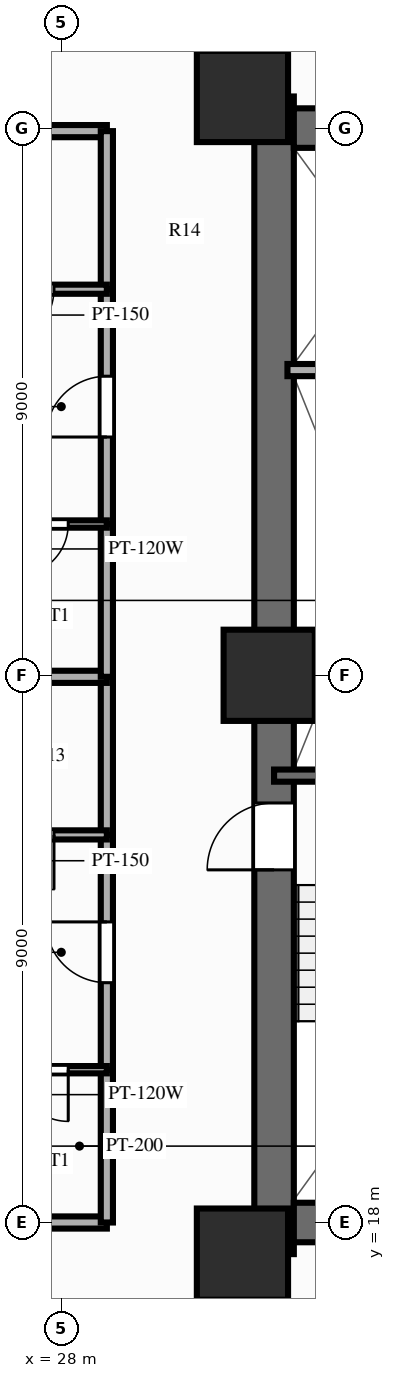
"""IFC4 building model, lengths in metres.
Left out: names, types, materials, properties, quantities, classifications, styles, units other than length and angle.
Written with IfcOpenShell. Run it as: python <this file> out.ifc"""

import sys

from ifc_helpers import new_model, si_unit, direction, frame, frame_2d, origin, origin_2d, place, context, subcontext, project, spatial, rectangle, extrude, source, transform, mapped, element, fill, save


model = new_model("IFC4")
c1 = context("Model", 3, precision=1e-05, world=origin(), true_north=direction((0.0, 1.0)))
c2 = subcontext(c1, "Body", "Model", "MODEL_VIEW")
j1 = project(units=[si_unit("LENGTHUNIT", "METRE"), si_unit("PLANEANGLEUNIT", "RADIAN")], contexts=[c1])
p1 = place(None, origin())
s1 = spatial("IfcSite", under=j1, at=p1, CompositionType="ELEMENT")
p2 = place(p1, origin())
s2 = spatial("IfcBuilding", under=s1, at=p2, CompositionType="ELEMENT")
p3 = place(p2, frame((0.0, 0.0, 46.4)))
s3 = spatial("IfcBuildingStorey", under=s2, at=p3, CompositionType="ELEMENT", Elevation=46.4)
p4 = place(p3, frame((31.5, 17.48, 0.0), z_axis=(0.0, 0.0, 1.0), x_axis=(0.0, 1.0, 0.0)))
e1 = element("IfcWall", 1, at=p4, inside=s3, PredefinedType="SHEAR", context=c2, shape_type="SweptSolid", body=[
    extrude(rectangle(XDim=19.04, YDim=0.65, at=frame_2d((9.52, 0.0))), origin(), (0.0, 0.0, 1.0), 3.0),
])
p5 = place(p4, frame((6.32, 0.0, 0.0)))
e2 = element("IfcOpeningElement", 2, at=p5, cuts=e1, PredefinedType="OPENING", context=c2, shape_type="SweptSolid", body=[
    extrude(rectangle(XDim=1.1, YDim=2.15, at=frame_2d((0.55, 1.075))), frame((0.0, 0.337, 0.0), z_axis=(0.0, -1.0, 0.0), x_axis=(1.0, 0.0, 0.0)), (0.0, 0.0, 1.0), 0.674),
])
p6 = place(p3, frame((31.825, 18.0, 0.0), z_axis=(0.0, 0.0, 1.0), x_axis=(1.0, 0.0, 0.0)))
e3 = element("IfcWall", 3, at=p6, inside=s3, PredefinedType="SHEAR", context=c2, shape_type="SweptSolid", body=[
    extrude(rectangle(XDim=12.35, YDim=0.65, at=frame_2d((6.175, 0.0))), origin(), (0.0, 0.0, 1.0), 3.0),
])
p7 = place(p3, frame((31.825, 36.0, 0.0), z_axis=(0.0, 0.0, 1.0), x_axis=(1.0, 0.0, 0.0)))
e4 = element("IfcWall", 4, at=p7, inside=s3, PredefinedType="SHEAR", context=c2, shape_type="SweptSolid", body=[
    extrude(rectangle(XDim=12.35, YDim=0.65, at=frame_2d((6.175, 0.0))), origin(), (0.0, 0.0, 1.0), 3.0),
])
p8 = place(p7, frame((5.125, 0.0, 0.0), z_axis=(0.0, 0.0, 1.0), x_axis=(-1.0, 0.0, 0.0)))
e5 = element("IfcOpeningElement", 5, at=p8, cuts=e4, PredefinedType="OPENING", context=c2, shape_type="SweptSolid", body=[
    extrude(rectangle(XDim=1.4, YDim=2.15, at=frame_2d((0.7, 1.075))), frame((0.0, 0.337, 0.0), z_axis=(0.0, -1.0, 0.0), x_axis=(1.0, 0.0, 0.0)), (0.0, 0.0, 1.0), 0.674),
])
m1 = source(origin(), c2, "Body", "SweptSolid", [
    extrude(rectangle(XDim=1.5, YDim=1.5, at=origin_2d()), origin(), (0.0, 0.0, 1.0), 3.0),
])
for number, where, z_axis, x_axis in (
    (6, (30.98, 17.48, 0.0), (0.0, 0.0, 1.0), (1.0, 0.0, 0.0)),
    (7, (30.98, 36.52, 0.0), (0.0, 0.0, 1.0), (1.0, 0.0, 0.0)),
    (8, (31.42, 27.0, 0.0), (0.0, 0.0, 1.0), (1.0, 0.0, 0.0)),
):
    element("IfcColumn", number, at=place(p3, frame(where, z_axis=z_axis, x_axis=x_axis)), inside=s3, PredefinedType="COLUMN", context=c2, shape_type="MappedRepresentation", body=[
        mapped(m1, transform((0.0, 0.0, 0.0), scale=1.0)),
    ])
p9 = place(p3, frame((31.5, 25.35, 0.0), z_axis=(0.0, 0.0, 1.0), x_axis=(1.0, 0.0, 0.0)))
e9 = element("IfcWall", 9, at=p9, inside=s3, PredefinedType="SOLIDWALL", context=c2, shape_type="SweptSolid", body=[
    extrude(rectangle(XDim=3.93, YDim=0.2, at=frame_2d((1.965, 0.0))), origin(), (0.0, 0.0, 1.0), 2.79),
])
p10 = place(p3, frame((31.72, 32.02, 0.0), z_axis=(0.0, 0.0, 1.0), x_axis=(1.0, 0.0, 0.0)))
e10 = element("IfcWall", 10, at=p10, inside=s3, PredefinedType="PARTITIONING", context=c2, shape_type="SweptSolid", body=[
    extrude(rectangle(XDim=2.8, YDim=0.2, at=frame_2d((1.4, 0.0))), origin(), (0.0, 0.0, 1.0), 2.79),
])
for number, where, z_axis, x_axis in (
    (11, (28.75, 18.0, 0.0), (0.0, 0.0, 1.0), (-1.0, 0.0, 0.0)),
    (12, (28.75, 35.95, 0.0), (0.0, 0.0, 1.0), (-1.0, 0.0, 0.0)),
):
    element("IfcWall", number, at=place(p3, frame(where, z_axis=z_axis, x_axis=x_axis)), inside=s3, PredefinedType="PARTITIONING", context=c2, shape_type="SweptSolid", body=[
        extrude(rectangle(XDim=16.6, YDim=0.2, at=frame_2d((8.3, 0.0))), origin(), (0.0, 0.0, 1.0), 2.24),
    ])
p11 = place(p3, frame((28.75, 18.0, 0.0), z_axis=(0.0, 0.0, 1.0), x_axis=(0.0, 1.0, 0.0)))
e13 = element("IfcWall", 13, at=p11, inside=s3, PredefinedType="PARTITIONING", context=c2, shape_type="SweptSolid", body=[
    extrude(rectangle(XDim=2.513, YDim=0.2, at=frame_2d((1.256, 0.0))), origin(), (0.0, 0.0, 1.0), 2.79),
])
p12 = place(p3, frame((28.75, 20.513, 0.0), z_axis=(0.0, 0.0, 1.0), x_axis=(0.0, 1.0, 0.0)))
e14 = element("IfcWall", 14, at=p12, inside=s3, PredefinedType="PARTITIONING", context=c2, shape_type="SweptSolid", body=[
    extrude(rectangle(XDim=3.862, YDim=0.2, at=frame_2d((1.931, 0.0))), origin(), (0.0, 0.0, 1.0), 2.79),
])
p13 = place(p12, frame((1.431, 0.0, 0.0)))
e15 = element("IfcOpeningElement", 15, at=p13, cuts=e14, PredefinedType="OPENING", context=c2, shape_type="SweptSolid", body=[
    extrude(rectangle(XDim=1.0, YDim=2.15, at=frame_2d((0.5, 1.075))), frame((0.0, 0.112, 0.0), z_axis=(0.0, -1.0, 0.0), x_axis=(1.0, 0.0, 0.0)), (0.0, 0.0, 1.0), 0.224),
])
p14 = place(p3, frame((28.75, 24.375, 0.0), z_axis=(0.0, 0.0, 1.0), x_axis=(0.0, 1.0, 0.0)))
e16 = element("IfcWall", 16, at=p14, inside=s3, PredefinedType="PARTITIONING", context=c2, shape_type="SweptSolid", body=[
    extrude(rectangle(XDim=2.6, YDim=0.2, at=frame_2d((1.3, 0.0))), origin(), (0.0, 0.0, 1.0), 2.79),
])
p15 = place(p3, frame((28.75, 20.513, 0.0), z_axis=(0.0, 0.0, 1.0), x_axis=(-1.0, 0.0, 0.0)))
e17 = element("IfcWall", 17, at=p15, inside=s3, PredefinedType="PARTITIONING", context=c2, shape_type="SweptSolid", body=[
    extrude(rectangle(XDim=2.12, YDim=0.12, at=frame_2d((1.06, 0.0))), origin(), (0.0, 0.0, 1.0), 2.79),
])
p16 = place(p15, frame((0.635, 0.0, 0.0)))
e18 = element("IfcOpeningElement", 18, at=p16, cuts=e17, PredefinedType="OPENING", context=c2, shape_type="SweptSolid", body=[
    extrude(rectangle(XDim=0.85, YDim=2.05, at=frame_2d((0.425, 1.025))), frame((0.0, 0.072, 0.0), z_axis=(0.0, -1.0, 0.0), x_axis=(1.0, 0.0, 0.0)), (0.0, 0.0, 1.0), 0.144),
])
p17 = place(p3, frame((28.75, 24.375, 0.0), z_axis=(0.0, 0.0, 1.0), x_axis=(-1.0, 0.0, 0.0)))
e19 = element("IfcWall", 19, at=p17, inside=s3, PredefinedType="PARTITIONING", context=c2, shape_type="SweptSolid", body=[
    extrude(rectangle(XDim=2.64, YDim=0.15, at=frame_2d((1.32, 0.0))), origin(), (0.0, 0.0, 1.0), 2.79),
])
p18 = place(p17, frame((0.87, 0.0, 0.0)))
e20 = element("IfcOpeningElement", 20, at=p18, cuts=e19, PredefinedType="OPENING", context=c2, shape_type="SweptSolid", body=[
    extrude(rectangle(XDim=0.9, YDim=2.1, at=frame_2d((0.45, 1.05))), frame((0.0, 0.087, 0.0), z_axis=(0.0, -1.0, 0.0), x_axis=(1.0, 0.0, 0.0)), (0.0, 0.0, 1.0), 0.174),
])
p19 = place(p3, frame((28.75, 26.975, 0.0), z_axis=(0.0, 0.0, 1.0), x_axis=(-1.0, 0.0, 0.0)))
e21 = element("IfcWall", 21, at=p19, inside=s3, PredefinedType="PARTITIONING", context=c2, shape_type="SweptSolid", body=[
    extrude(rectangle(XDim=16.6, YDim=0.2, at=frame_2d((8.3, 0.0))), origin(), (0.0, 0.0, 1.0), 2.79),
])
p20 = place(p3, frame((28.75, 26.975, 0.0), z_axis=(0.0, 0.0, 1.0), x_axis=(0.0, 1.0, 0.0)))
e22 = element("IfcWall", 22, at=p20, inside=s3, PredefinedType="PARTITIONING", context=c2, shape_type="SweptSolid", body=[
    extrude(rectangle(XDim=2.513, YDim=0.2, at=frame_2d((1.256, 0.0))), origin(), (0.0, 0.0, 1.0), 2.79),
])
p21 = place(p3, frame((28.75, 29.488, 0.0), z_axis=(0.0, 0.0, 1.0), x_axis=(0.0, 1.0, 0.0)))
e23 = element("IfcWall", 23, at=p21, inside=s3, PredefinedType="PARTITIONING", context=c2, shape_type="SweptSolid", body=[
    extrude(rectangle(XDim=3.862, YDim=0.2, at=frame_2d((1.931, 0.0))), origin(), (0.0, 0.0, 1.0), 2.79),
])
p22 = place(p21, frame((1.431, 0.0, 0.0)))
e24 = element("IfcOpeningElement", 24, at=p22, cuts=e23, PredefinedType="OPENING", context=c2, shape_type="SweptSolid", body=[
    extrude(rectangle(XDim=1.0, YDim=2.15, at=frame_2d((0.5, 1.075))), frame((0.0, 0.112, 0.0), z_axis=(0.0, -1.0, 0.0), x_axis=(1.0, 0.0, 0.0)), (0.0, 0.0, 1.0), 0.224),
])
p23 = place(p3, frame((28.75, 33.35, 0.0), z_axis=(0.0, 0.0, 1.0), x_axis=(0.0, 1.0, 0.0)))
e25 = element("IfcWall", 25, at=p23, inside=s3, PredefinedType="PARTITIONING", context=c2, shape_type="SweptSolid", body=[
    extrude(rectangle(XDim=2.6, YDim=0.2, at=frame_2d((1.3, 0.0))), origin(), (0.0, 0.0, 1.0), 2.79),
])
p24 = place(p3, frame((28.75, 29.488, 0.0), z_axis=(0.0, 0.0, 1.0), x_axis=(-1.0, 0.0, 0.0)))
e26 = element("IfcWall", 26, at=p24, inside=s3, PredefinedType="PARTITIONING", context=c2, shape_type="SweptSolid", body=[
    extrude(rectangle(XDim=2.12, YDim=0.12, at=frame_2d((1.06, 0.0))), origin(), (0.0, 0.0, 1.0), 2.79),
])
p25 = place(p24, frame((0.635, 0.0, 0.0)))
e27 = element("IfcOpeningElement", 27, at=p25, cuts=e26, PredefinedType="OPENING", context=c2, shape_type="SweptSolid", body=[
    extrude(rectangle(XDim=0.85, YDim=2.05, at=frame_2d((0.425, 1.025))), frame((0.0, 0.072, 0.0), z_axis=(0.0, -1.0, 0.0), x_axis=(1.0, 0.0, 0.0)), (0.0, 0.0, 1.0), 0.144),
])
p26 = place(p3, frame((28.75, 33.35, 0.0), z_axis=(0.0, 0.0, 1.0), x_axis=(-1.0, 0.0, 0.0)))
e28 = element("IfcWall", 28, at=p26, inside=s3, PredefinedType="PARTITIONING", context=c2, shape_type="SweptSolid", body=[
    extrude(rectangle(XDim=2.64, YDim=0.15, at=frame_2d((1.32, 0.0))), origin(), (0.0, 0.0, 1.0), 2.79),
])
p27 = place(p26, frame((0.87, 0.0, 0.0)))
e29 = element("IfcOpeningElement", 29, at=p27, cuts=e28, PredefinedType="OPENING", context=c2, shape_type="SweptSolid", body=[
    extrude(rectangle(XDim=0.9, YDim=2.1, at=frame_2d((0.45, 1.05))), frame((0.0, 0.087, 0.0), z_axis=(0.0, -1.0, 0.0), x_axis=(1.0, 0.0, 0.0)), (0.0, 0.0, 1.0), 0.174),
])
m2 = source(origin(), c2, "Body", "SweptSolid", [
    extrude(rectangle(XDim=1.1, YDim=2.15, at=frame_2d((0.55, 1.075))), frame((0.0, 0.025, 0.0), z_axis=(0.0, -1.0, 0.0), x_axis=(1.0, 0.0, 0.0)), (0.0, 0.0, 1.0), 0.05),
])
p28 = place(p5, origin())
e30 = element("IfcDoor", 30, at=p28, inside=s3, OperationType="SINGLE_SWING_LEFT", PredefinedType="DOOR", context=c2, shape_type="MappedRepresentation", body=[
    mapped(m2, transform((0.0, 0.0, 0.0), scale=1.0)),
])
fill(e2, e30)
m3 = source(origin(), c2, "Body", "SweptSolid", [
    extrude(rectangle(XDim=1.0, YDim=2.15, at=frame_2d((0.5, 1.075))), frame((0.0, 0.025, 0.0), z_axis=(0.0, -1.0, 0.0), x_axis=(1.0, 0.0, 0.0)), (0.0, 0.0, 1.0), 0.05),
])
p29 = place(p13, origin())
e31 = element("IfcDoor", 31, at=p29, inside=s3, OperationType="SINGLE_SWING_RIGHT", PredefinedType="DOOR", context=c2, shape_type="MappedRepresentation", body=[
    mapped(m3, transform((0.0, 0.0, 0.0), scale=1.0)),
])
fill(e15, e31)
m4 = source(origin(), c2, "Body", "SweptSolid", [
    extrude(rectangle(XDim=0.85, YDim=2.05, at=frame_2d((0.425, 1.025))), frame((0.0, 0.025, 0.0), z_axis=(0.0, -1.0, 0.0), x_axis=(1.0, 0.0, 0.0)), (0.0, 0.0, 1.0), 0.05),
])
p30 = place(p16, origin())
e32 = element("IfcDoor", 32, at=p30, inside=s3, OperationType="SINGLE_SWING_LEFT", PredefinedType="DOOR", context=c2, shape_type="MappedRepresentation", body=[
    mapped(m4, transform((0.0, 0.0, 0.0), scale=1.0)),
])
fill(e18, e32)
m5 = source(origin(), c2, "Body", "SweptSolid", [
    extrude(rectangle(XDim=0.9, YDim=2.1, at=frame_2d((0.45, 1.05))), frame((0.0, 0.025, 0.0), z_axis=(0.0, -1.0, 0.0), x_axis=(1.0, 0.0, 0.0)), (0.0, 0.0, 1.0), 0.05),
])
p31 = place(p18, origin())
e33 = element("IfcDoor", 33, at=p31, inside=s3, OperationType="SINGLE_SWING_LEFT", PredefinedType="DOOR", context=c2, shape_type="MappedRepresentation", body=[
    mapped(m5, transform((0.0, 0.0, 0.0), scale=1.0)),
])
fill(e20, e33)
p32 = place(p22, origin())
e34 = element("IfcDoor", 34, at=p32, inside=s3, OperationType="SINGLE_SWING_LEFT", PredefinedType="DOOR", context=c2, shape_type="MappedRepresentation", body=[
    mapped(m3, transform((0.0, 0.0, 0.0), scale=1.0)),
])
fill(e24, e34)
p33 = place(p25, origin())
e35 = element("IfcDoor", 35, at=p33, inside=s3, OperationType="SINGLE_SWING_RIGHT", PredefinedType="DOOR", context=c2, shape_type="MappedRepresentation", body=[
    mapped(m4, transform((0.0, 0.0, 0.0), scale=1.0)),
])
fill(e27, e35)
p34 = place(p27, origin())
e36 = element("IfcDoor", 36, at=p34, inside=s3, OperationType="SINGLE_SWING_RIGHT", PredefinedType="DOOR", context=c2, shape_type="MappedRepresentation", body=[
    mapped(m5, transform((0.0, 0.0, 0.0), scale=1.0)),
])
fill(e29, e36)
save(model, sys.argv[1])
